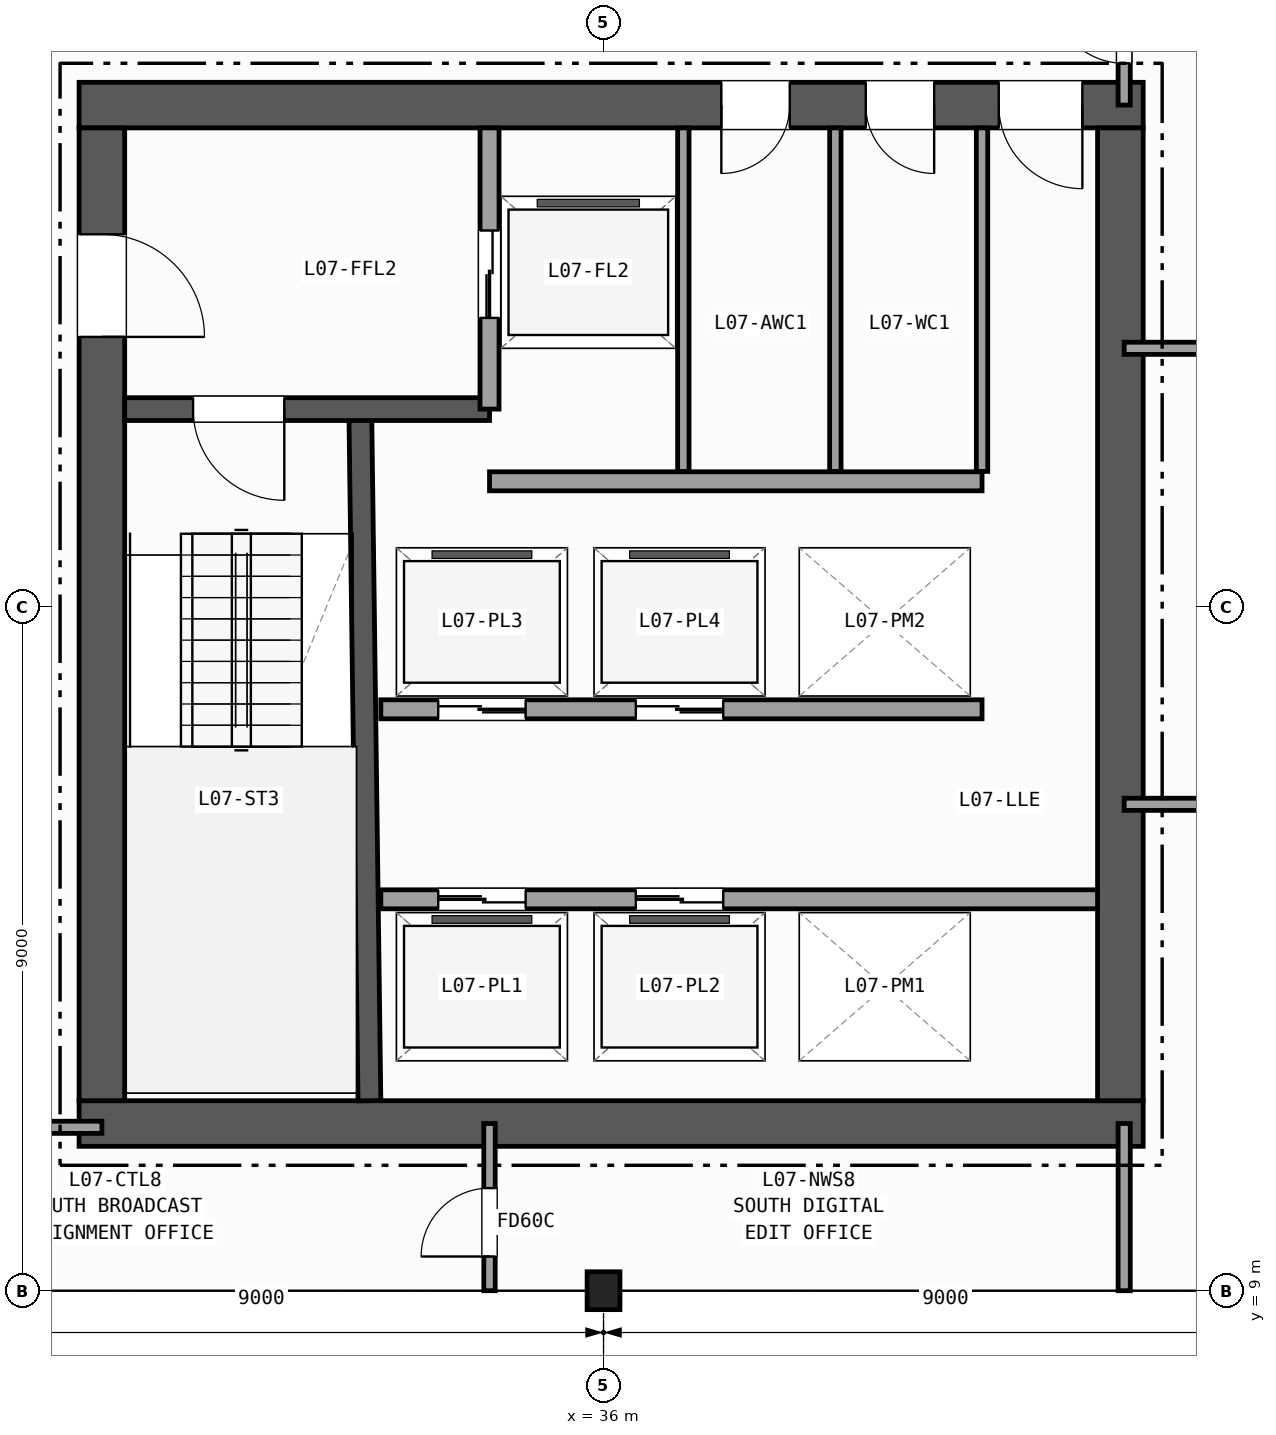
"""IFC4 building model, lengths in metres.
Left out: names, types, materials, properties, quantities, classifications, styles, units other than length and angle.
Written with IfcOpenShell. Run it as: python <this file> out.ifc"""

import sys

from ifc_helpers import new_model, si_unit, direction, frame, frame_2d, origin, origin_2d, place, context, subcontext, project, spatial, rectangle, i_section, extrude, element, fill, save


model = new_model("IFC4")
c1 = context("Model", 3, precision=1e-05, world=origin(), true_north=direction((0.0, 1.0)))
c2 = subcontext(c1, "Body", "Model", "MODEL_VIEW")
j1 = project(units=[si_unit("LENGTHUNIT", "METRE"), si_unit("PLANEANGLEUNIT", "RADIAN")], contexts=[c1])
p1 = place(None, origin())
s1 = spatial("IfcSite", under=j1, at=p1, CompositionType="ELEMENT")
p2 = place(p1, origin())
s2 = spatial("IfcBuilding", under=s1, at=p2, CompositionType="ELEMENT")
p3 = place(p2, frame((0.0, 0.0, 36.0)))
s3 = spatial("IfcBuildingStorey", under=s2, at=p3, CompositionType="ELEMENT", Elevation=36.0)
p4 = place(p3, frame((36.0, 9.0, 0.0), z_axis=(0.0, 0.0, 1.0), x_axis=(1.0, 0.0, 0.0)))
e1 = element("IfcColumn", 1, at=p4, inside=s3, PredefinedType="COLUMN", context=c2, shape_type="SweptSolid", body=[
    extrude(i_section(OverallWidth=0.432, OverallDepth=0.498, WebThickness=0.056, FlangeThickness=0.089, FilletRadius=0.015, at=origin_2d()), origin(), (0.0, 0.0, 1.0), 3.7),
])
p5 = place(p3, frame((29.1, 11.2, 0.0), z_axis=(0.0, 0.0, 1.0), x_axis=(1.0, 0.0, 0.0)))
e2 = element("IfcWall", 2, at=p5, inside=s3, PredefinedType="SHEAR", context=c2, shape_type="SweptSolid", body=[
    extrude(rectangle(XDim=14.0, YDim=0.6, at=frame_2d((7.0, 0.0))), origin(), (0.0, 0.0, 1.0), 3.42),
])
p6 = place(p3, frame((43.1, 24.6, 0.0), z_axis=(0.0, 0.0, 1.0), x_axis=(-1.0, 0.0, 0.0)))
e3 = element("IfcWall", 3, at=p6, inside=s3, PredefinedType="SHEAR", context=c2, shape_type="SweptSolid", body=[
    extrude(rectangle(XDim=14.0, YDim=0.6, at=frame_2d((7.0, 0.0))), origin(), (0.0, 0.0, 1.0), 3.42),
])
p7 = place(p6, frame((0.8, 0.0, 0.0)))
e4 = element("IfcOpeningElement", 4, at=p7, cuts=e3, PredefinedType="OPENING", context=c2, shape_type="SweptSolid", body=[
    extrude(rectangle(XDim=1.1, YDim=2.15, at=frame_2d((0.55, 1.075))), frame((0.0, 0.31, 0.0), z_axis=(0.0, -1.0, 0.0), x_axis=(1.0, 0.0, 0.0)), (0.0, 0.0, 1.0), 0.62),
])
p8 = place(p6, frame((2.75, 0.0, 0.0)))
e5 = element("IfcOpeningElement", 5, at=p8, cuts=e3, PredefinedType="OPENING", context=c2, shape_type="SweptSolid", body=[
    extrude(rectangle(XDim=0.9, YDim=2.1, at=frame_2d((0.45, 1.05))), frame((0.0, 0.31, 0.0), z_axis=(0.0, -1.0, 0.0), x_axis=(1.0, 0.0, 0.0)), (0.0, 0.0, 1.0), 0.62),
])
p9 = place(p6, frame((4.65, 0.0, 0.0)))
e6 = element("IfcOpeningElement", 6, at=p9, cuts=e3, PredefinedType="OPENING", context=c2, shape_type="SweptSolid", body=[
    extrude(rectangle(XDim=0.9, YDim=2.1, at=frame_2d((0.45, 1.05))), frame((0.0, 0.31, 0.0), z_axis=(0.0, -1.0, 0.0), x_axis=(1.0, 0.0, 0.0)), (0.0, 0.0, 1.0), 0.62),
])
p10 = place(p3, frame((29.4, 24.3, 0.0), z_axis=(0.0, 0.0, 1.0), x_axis=(0.0, -1.0, 0.0)))
e7 = element("IfcWall", 7, at=p10, inside=s3, PredefinedType="SHEAR", context=c2, shape_type="SweptSolid", body=[
    extrude(rectangle(XDim=12.8, YDim=0.6, at=frame_2d((6.4, 0.0))), origin(), (0.0, 0.0, 1.0), 3.42),
])
p11 = place(p10, frame((1.4, 0.0, 0.0)))
e8 = element("IfcOpeningElement", 8, at=p11, cuts=e7, PredefinedType="OPENING", context=c2, shape_type="SweptSolid", body=[
    extrude(rectangle(XDim=1.35, YDim=2.15, at=frame_2d((0.675, 1.075))), frame((0.0, 0.31, 0.0), z_axis=(0.0, -1.0, 0.0), x_axis=(1.0, 0.0, 0.0)), (0.0, 0.0, 1.0), 0.62),
])
p12 = place(p3, frame((42.8, 11.5, 0.0), z_axis=(0.0, 0.0, 1.0), x_axis=(0.0, 1.0, 0.0)))
e9 = element("IfcWall", 9, at=p12, inside=s3, PredefinedType="SHEAR", context=c2, shape_type="SweptSolid", body=[
    extrude(rectangle(XDim=12.8, YDim=0.6, at=frame_2d((6.4, 0.0))), origin(), (0.0, 0.0, 1.0), 3.42),
])
p13 = place(p3, frame((32.92, 11.5, 0.0), z_axis=(0.0, 0.0, 1.0), x_axis=(-0.013244407292, 0.999912288991, 0.0)))
e10 = element("IfcWall", 10, at=p13, inside=s3, PredefinedType="SHEAR", context=c2, shape_type="SweptSolid", body=[
    extrude(rectangle(XDim=9.051, YDim=0.3, at=frame_2d((4.525, 0.0))), origin(), (0.0, 0.0, 1.0), 3.42),
])
p14 = place(p3, frame((34.5, 20.6, 0.0), z_axis=(0.0, 0.0, 1.0), x_axis=(-1.0, 0.0, 0.0)))
e11 = element("IfcWall", 11, at=p14, inside=s3, PredefinedType="SHEAR", context=c2, shape_type="SweptSolid", body=[
    extrude(rectangle(XDim=4.8, YDim=0.3, at=frame_2d((2.4, 0.0))), origin(), (0.0, 0.0, 1.0), 3.42),
])
p15 = place(p14, frame((2.7, 0.0, 0.0)))
e12 = element("IfcOpeningElement", 12, at=p15, cuts=e11, PredefinedType="OPENING", context=c2, shape_type="SweptSolid", body=[
    extrude(rectangle(XDim=1.2, YDim=2.15, at=frame_2d((0.6, 1.075))), frame((0.0, 0.16, 0.0), z_axis=(0.0, -1.0, 0.0), x_axis=(1.0, 0.0, 0.0)), (0.0, 0.0, 1.0), 0.32),
])
p16 = place(p3, frame((34.5, 20.6, 0.0), z_axis=(0.0, 0.0, 1.0), x_axis=(0.0, 1.0, 0.0)))
e13 = element("IfcWall", 13, at=p16, inside=s3, PredefinedType="PARTITIONING", context=c2, shape_type="SweptSolid", body=[
    extrude(rectangle(XDim=3.7, YDim=0.25, at=frame_2d((1.85, 0.0))), origin(), (0.0, 0.0, 1.0), 3.42),
])
p17 = place(p16, frame((1.2, 0.0, 0.0)))
e14 = element("IfcOpeningElement", 14, at=p17, cuts=e13, PredefinedType="OPENING", context=c2, shape_type="SweptSolid", body=[
    extrude(rectangle(XDim=1.15, YDim=2.15, at=frame_2d((0.575, 1.075))), frame((0.0, 0.135, 0.0), z_axis=(0.0, -1.0, 0.0), x_axis=(1.0, 0.0, 0.0)), (0.0, 0.0, 1.0), 0.27),
])
p18 = place(p3, frame((34.5, 19.65, 0.0), z_axis=(0.0, 0.0, 1.0), x_axis=(1.0, 0.0, 0.0)))
e15 = element("IfcWall", 15, at=p18, inside=s3, PredefinedType="PARTITIONING", context=c2, shape_type="SweptSolid", body=[
    extrude(rectangle(XDim=6.48, YDim=0.25, at=frame_2d((3.24, 0.0))), origin(), (0.0, 0.0, 1.0), 3.42),
])
p19 = place(p3, frame((33.07, 14.15, 0.0), z_axis=(0.0, 0.0, 1.0), x_axis=(1.0, 0.0, 0.0)))
e16 = element("IfcWall", 16, at=p19, inside=s3, PredefinedType="PARTITIONING", context=c2, shape_type="SweptSolid", body=[
    extrude(rectangle(XDim=9.43, YDim=0.25, at=frame_2d((4.715, 0.0))), origin(), (0.0, 0.0, 1.0), 3.42),
])
p20 = place(p19, frame((0.755, 0.0, 0.0)))
e17 = element("IfcOpeningElement", 17, at=p20, cuts=e16, PredefinedType="OPENING", context=c2, shape_type="SweptSolid", body=[
    extrude(rectangle(XDim=1.15, YDim=2.15, at=frame_2d((0.575, 1.075))), frame((0.0, 0.135, 0.0), z_axis=(0.0, -1.0, 0.0), x_axis=(1.0, 0.0, 0.0)), (0.0, 0.0, 1.0), 0.27),
])
p21 = place(p19, frame((3.355, 0.0, 0.0)))
e18 = element("IfcOpeningElement", 18, at=p21, cuts=e16, PredefinedType="OPENING", context=c2, shape_type="SweptSolid", body=[
    extrude(rectangle(XDim=1.15, YDim=2.15, at=frame_2d((0.575, 1.075))), frame((0.0, 0.135, 0.0), z_axis=(0.0, -1.0, 0.0), x_axis=(1.0, 0.0, 0.0)), (0.0, 0.0, 1.0), 0.27),
])
p22 = place(p3, frame((40.98, 16.65, 0.0), z_axis=(0.0, 0.0, 1.0), x_axis=(-1.0, 0.0, 0.0)))
e19 = element("IfcWall", 19, at=p22, inside=s3, PredefinedType="PARTITIONING", context=c2, shape_type="SweptSolid", body=[
    extrude(rectangle(XDim=7.91, YDim=0.25, at=frame_2d((3.955, 0.0))), origin(), (0.0, 0.0, 1.0), 3.42),
])
p23 = place(p22, frame((6.005, 0.0, 0.0)))
e20 = element("IfcOpeningElement", 20, at=p23, cuts=e19, PredefinedType="OPENING", context=c2, shape_type="SweptSolid", body=[
    extrude(rectangle(XDim=1.15, YDim=2.15, at=frame_2d((0.575, 1.075))), frame((0.0, 0.135, 0.0), z_axis=(0.0, -1.0, 0.0), x_axis=(1.0, 0.0, 0.0)), (0.0, 0.0, 1.0), 0.27),
])
p24 = place(p22, frame((3.405, 0.0, 0.0)))
e21 = element("IfcOpeningElement", 21, at=p24, cuts=e19, PredefinedType="OPENING", context=c2, shape_type="SweptSolid", body=[
    extrude(rectangle(XDim=1.15, YDim=2.15, at=frame_2d((0.575, 1.075))), frame((0.0, 0.135, 0.0), z_axis=(0.0, -1.0, 0.0), x_axis=(1.0, 0.0, 0.0)), (0.0, 0.0, 1.0), 0.27),
])
for number, where, z_axis, x_axis in (
    (22, (37.05, 19.78, 0.0), (0.0, 0.0, 1.0), (0.0, 1.0, 0.0)),
    (23, (39.05, 19.78, 0.0), (0.0, 0.0, 1.0), (0.0, 1.0, 0.0)),
    (24, (40.98, 19.78, 0.0), (0.0, 0.0, 1.0), (0.0, 1.0, 0.0)),
):
    element("IfcWall", number, at=place(p3, frame(where, z_axis=z_axis, x_axis=x_axis)), inside=s3, PredefinedType="PARTITIONING", context=c2, shape_type="SweptSolid", body=[
        extrude(rectangle(XDim=4.52, YDim=0.15, at=frame_2d((2.26, 0.0))), origin(), (0.0, 0.0, 1.0), 3.42),
    ])
p25 = place(p3, frame((24.65, 11.15, 0.0), z_axis=(0.0, 0.0, 1.0), x_axis=(1.0, 0.0, 0.0)))
e25 = element("IfcWall", 25, at=p25, inside=s3, PredefinedType="PARTITIONING", context=c2, shape_type="SweptSolid", body=[
    extrude(rectangle(XDim=4.75, YDim=0.16, at=frame_2d((2.375, 0.0))), origin(), (0.0, 0.0, 1.0), 2.792),
])
p26 = place(p25, frame((1.2, 0.0, 0.0)))
e26 = element("IfcOpeningElement", 26, at=p26, cuts=e25, PredefinedType="OPENING", context=c2, shape_type="SweptSolid", body=[
    extrude(rectangle(XDim=1.2, YDim=2.15, at=frame_2d((0.6, 1.075))), frame((0.0, 0.09, 0.0), z_axis=(0.0, -1.0, 0.0), x_axis=(1.0, 0.0, 0.0)), (0.0, 0.0, 1.0), 0.18),
])
p27 = place(p3, frame((34.5, 9.0, 0.0), z_axis=(0.0, 0.0, 1.0), x_axis=(0.0, 1.0, 0.0)))
e27 = element("IfcWall", 27, at=p27, inside=s3, PredefinedType="PARTITIONING", context=c2, shape_type="SweptSolid", body=[
    extrude(rectangle(XDim=2.2, YDim=0.15, at=frame_2d((1.1, 0.0))), origin(), (0.0, 0.0, 1.0), 2.627),
])
p28 = place(p27, frame((0.45, 0.0, 0.0)))
e28 = element("IfcOpeningElement", 28, at=p28, cuts=e27, PredefinedType="OPENING", context=c2, shape_type="SweptSolid", body=[
    extrude(rectangle(XDim=0.9, YDim=2.1, at=frame_2d((0.45, 1.05))), frame((0.0, 0.085, 0.0), z_axis=(0.0, -1.0, 0.0), x_axis=(1.0, 0.0, 0.0)), (0.0, 0.0, 1.0), 0.17),
])
p29 = place(p3, frame((42.85, 9.0, 0.0), z_axis=(0.0, 0.0, 1.0), x_axis=(0.0, 1.0, 0.0)))
e29 = element("IfcWall", 29, at=p29, inside=s3, PredefinedType="PARTITIONING", context=c2, shape_type="SweptSolid", body=[
    extrude(rectangle(XDim=2.2, YDim=0.16, at=frame_2d((1.1, 0.0))), origin(), (0.0, 0.0, 1.0), 2.627),
])
p30 = place(p3, frame((42.85, 24.6, 0.0), z_axis=(0.0, 0.0, 1.0), x_axis=(0.0, 1.0, 0.0)))
e30 = element("IfcWall", 30, at=p30, inside=s3, PredefinedType="PARTITIONING", context=c2, shape_type="SweptSolid", body=[
    extrude(rectangle(XDim=2.4, YDim=0.16, at=frame_2d((1.2, 0.0))), origin(), (0.0, 0.0, 1.0), 2.627),
])
p31 = place(p30, frame((0.55, 0.0, 0.0)))
e31 = element("IfcOpeningElement", 31, at=p31, cuts=e30, PredefinedType="OPENING", context=c2, shape_type="SweptSolid", body=[
    extrude(rectangle(XDim=0.95, YDim=2.1, at=frame_2d((0.475, 1.05))), frame((0.0, 0.09, 0.0), z_axis=(0.0, -1.0, 0.0), x_axis=(1.0, 0.0, 0.0)), (0.0, 0.0, 1.0), 0.18),
])
p32 = place(p3, frame((42.85, 15.4, 0.0), z_axis=(0.0, 0.0, 1.0), x_axis=(1.0, 0.0, 0.0)))
e32 = element("IfcWall", 32, at=p32, inside=s3, PredefinedType="PARTITIONING", context=c2, shape_type="SweptSolid", body=[
    extrude(rectangle(XDim=20.582, YDim=0.16, at=frame_2d((10.291, 0.0))), origin(), (0.0, 0.0, 1.0), 3.42),
])
p33 = place(p32, frame((3.4, 0.0, 0.0)))
e33 = element("IfcOpeningElement", 33, at=p33, cuts=e32, PredefinedType="OPENING", context=c2, shape_type="SweptSolid", body=[
    extrude(rectangle(XDim=1.0, YDim=2.1, at=frame_2d((0.5, 1.05))), frame((0.0, 0.09, 0.0), z_axis=(0.0, -1.0, 0.0), x_axis=(1.0, 0.0, 0.0)), (0.0, 0.0, 1.0), 0.18),
])
p34 = place(p3, frame((42.85, 21.4, 0.0), z_axis=(0.0, 0.0, 1.0), x_axis=(1.0, 0.0, 0.0)))
e34 = element("IfcWall", 34, at=p34, inside=s3, PredefinedType="PARTITIONING", context=c2, shape_type="SweptSolid", body=[
    extrude(rectangle(XDim=20.5, YDim=0.16, at=frame_2d((10.25, 0.0))), origin(), (0.0, 0.0, 1.0), 3.42),
])
p35 = place(p34, frame((3.4, 0.0, 0.0)))
e35 = element("IfcOpeningElement", 35, at=p35, cuts=e34, PredefinedType="OPENING", context=c2, shape_type="SweptSolid", body=[
    extrude(rectangle(XDim=1.05, YDim=2.15, at=frame_2d((0.525, 1.075))), frame((0.0, 0.09, 0.0), z_axis=(0.0, -1.0, 0.0), x_axis=(1.0, 0.0, 0.0)), (0.0, 0.0, 1.0), 0.18),
])
p36 = place(p15, origin())
e36 = element("IfcDoor", 36, at=p36, inside=s3, OperationType="SINGLE_SWING_LEFT", PredefinedType="DOOR", context=c2, shape_type="SweptSolid", body=[
    extrude(rectangle(XDim=1.2, YDim=2.15, at=frame_2d((0.6, 1.075))), frame((0.0, 0.025, 0.0), z_axis=(0.0, -1.0, 0.0), x_axis=(1.0, 0.0, 0.0)), (0.0, 0.0, 1.0), 0.05),
])
fill(e12, e36)
p37 = place(p11, origin())
e37 = element("IfcDoor", 37, at=p37, inside=s3, OperationType="SINGLE_SWING_RIGHT", PredefinedType="DOOR", context=c2, shape_type="SweptSolid", body=[
    extrude(rectangle(XDim=1.35, YDim=2.15, at=frame_2d((0.675, 1.075))), frame((0.0, 0.025, 0.0), z_axis=(0.0, -1.0, 0.0), x_axis=(1.0, 0.0, 0.0)), (0.0, 0.0, 1.0), 0.05),
])
fill(e8, e37)
p38 = place(p7, origin())
e38 = element("IfcDoor", 38, at=p38, inside=s3, OperationType="SINGLE_SWING_LEFT", PredefinedType="DOOR", context=c2, shape_type="SweptSolid", body=[
    extrude(rectangle(XDim=1.1, YDim=2.15, at=frame_2d((0.55, 1.075))), frame((0.0, 0.025, 0.0), z_axis=(0.0, -1.0, 0.0), x_axis=(1.0, 0.0, 0.0)), (0.0, 0.0, 1.0), 0.05),
])
fill(e4, e38)
p39 = place(p8, origin())
e39 = element("IfcDoor", 39, at=p39, inside=s3, OperationType="SINGLE_SWING_LEFT", PredefinedType="DOOR", context=c2, shape_type="SweptSolid", body=[
    extrude(rectangle(XDim=0.9, YDim=2.1, at=frame_2d((0.45, 1.05))), frame((0.0, 0.025, 0.0), z_axis=(0.0, -1.0, 0.0), x_axis=(1.0, 0.0, 0.0)), (0.0, 0.0, 1.0), 0.05),
])
fill(e5, e39)
p40 = place(p9, origin())
e40 = element("IfcDoor", 40, at=p40, inside=s3, OperationType="SINGLE_SWING_RIGHT", PredefinedType="DOOR", context=c2, shape_type="SweptSolid", body=[
    extrude(rectangle(XDim=0.9, YDim=2.1, at=frame_2d((0.45, 1.05))), frame((0.0, 0.025, 0.0), z_axis=(0.0, -1.0, 0.0), x_axis=(1.0, 0.0, 0.0)), (0.0, 0.0, 1.0), 0.05),
])
fill(e6, e40)
p41 = place(p17, origin())
e41 = element("IfcDoor", 41, at=p41, inside=s3, OperationType="DOUBLE_DOOR_SLIDING", PredefinedType="DOOR", context=c2, shape_type="SweptSolid", body=[
    extrude(rectangle(XDim=1.15, YDim=2.15, at=frame_2d((0.575, 1.075))), frame((0.0, 0.025, 0.0), z_axis=(0.0, -1.0, 0.0), x_axis=(1.0, 0.0, 0.0)), (0.0, 0.0, 1.0), 0.05),
])
fill(e14, e41)
p42 = place(p20, origin())
e42 = element("IfcDoor", 42, at=p42, inside=s3, OperationType="DOUBLE_DOOR_SLIDING", PredefinedType="DOOR", context=c2, shape_type="SweptSolid", body=[
    extrude(rectangle(XDim=1.15, YDim=2.15, at=frame_2d((0.575, 1.075))), frame((0.0, 0.025, 0.0), z_axis=(0.0, -1.0, 0.0), x_axis=(1.0, 0.0, 0.0)), (0.0, 0.0, 1.0), 0.05),
])
fill(e17, e42)
p43 = place(p21, origin())
e43 = element("IfcDoor", 43, at=p43, inside=s3, OperationType="DOUBLE_DOOR_SLIDING", PredefinedType="DOOR", context=c2, shape_type="SweptSolid", body=[
    extrude(rectangle(XDim=1.15, YDim=2.15, at=frame_2d((0.575, 1.075))), frame((0.0, 0.025, 0.0), z_axis=(0.0, -1.0, 0.0), x_axis=(1.0, 0.0, 0.0)), (0.0, 0.0, 1.0), 0.05),
])
fill(e18, e43)
p44 = place(p23, origin())
e44 = element("IfcDoor", 44, at=p44, inside=s3, OperationType="DOUBLE_DOOR_SLIDING", PredefinedType="DOOR", context=c2, shape_type="SweptSolid", body=[
    extrude(rectangle(XDim=1.15, YDim=2.15, at=frame_2d((0.575, 1.075))), frame((0.0, 0.025, 0.0), z_axis=(0.0, -1.0, 0.0), x_axis=(1.0, 0.0, 0.0)), (0.0, 0.0, 1.0), 0.05),
])
fill(e20, e44)
p45 = place(p24, origin())
e45 = element("IfcDoor", 45, at=p45, inside=s3, OperationType="DOUBLE_DOOR_SLIDING", PredefinedType="DOOR", context=c2, shape_type="SweptSolid", body=[
    extrude(rectangle(XDim=1.15, YDim=2.15, at=frame_2d((0.575, 1.075))), frame((0.0, 0.025, 0.0), z_axis=(0.0, -1.0, 0.0), x_axis=(1.0, 0.0, 0.0)), (0.0, 0.0, 1.0), 0.05),
])
fill(e21, e45)
p46 = place(p28, origin())
e46 = element("IfcDoor", 46, at=p46, inside=s3, OperationType="SINGLE_SWING_LEFT", PredefinedType="DOOR", context=c2, shape_type="SweptSolid", body=[
    extrude(rectangle(XDim=0.9, YDim=2.1, at=frame_2d((0.45, 1.05))), frame((0.0, 0.025, 0.0), z_axis=(0.0, -1.0, 0.0), x_axis=(1.0, 0.0, 0.0)), (0.0, 0.0, 1.0), 0.05),
])
fill(e28, e46)
p47 = place(p31, origin())
e47 = element("IfcDoor", 47, at=p47, inside=s3, OperationType="SINGLE_SWING_RIGHT", PredefinedType="DOOR", context=c2, shape_type="SweptSolid", body=[
    extrude(rectangle(XDim=0.95, YDim=2.1, at=frame_2d((0.475, 1.05))), frame((0.0, 0.025, 0.0), z_axis=(0.0, -1.0, 0.0), x_axis=(1.0, 0.0, 0.0)), (0.0, 0.0, 1.0), 0.05),
])
fill(e31, e47)
save(model, sys.argv[1])
